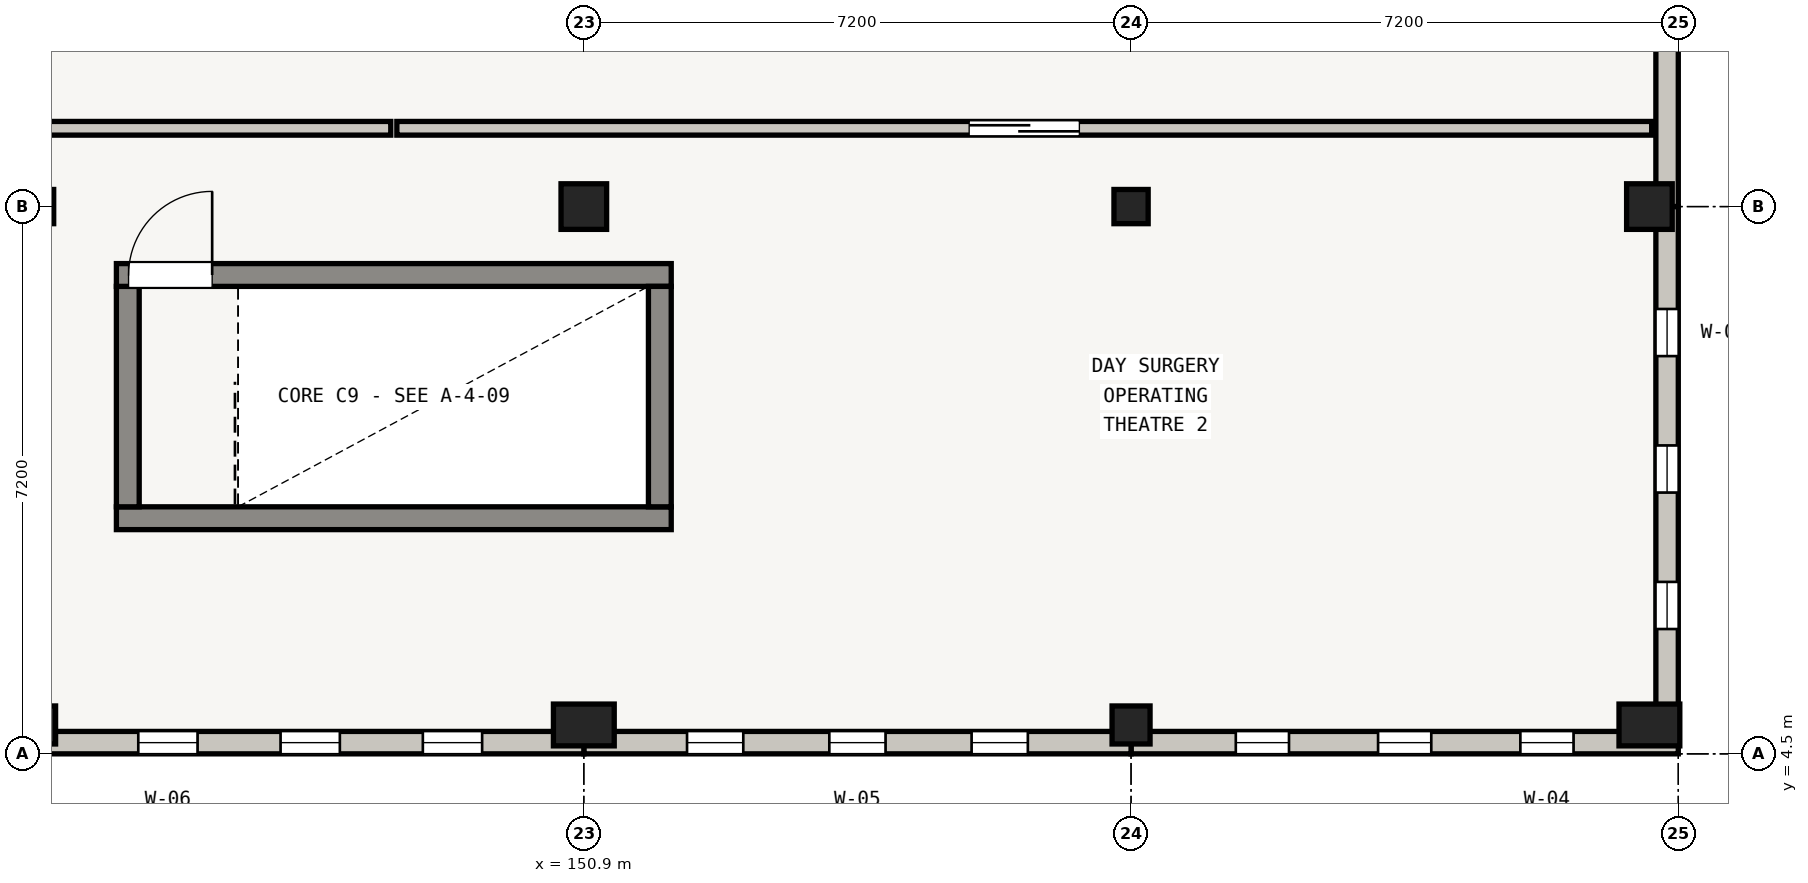
"""IFC4 building model, lengths in metres.
Left out: names, types, materials, properties, quantities, classifications, styles, units other than length and angle.
Written with IfcOpenShell. Run it as: python <this file> out.ifc"""

import sys

from ifc_helpers import new_model, si_unit, direction, frame, frame_2d, origin, origin_2d, place, context, subcontext, project, spatial, rectangle, extrude, element, fill, save


model = new_model("IFC4")
c1 = context("Model", 3, precision=1e-05, world=origin(), true_north=direction((0.0, 1.0)))
c2 = subcontext(c1, "Body", "Model", "MODEL_VIEW")
j1 = project(units=[si_unit("LENGTHUNIT", "METRE"), si_unit("PLANEANGLEUNIT", "RADIAN")], contexts=[c1])
p1 = place(None, origin())
s1 = spatial("IfcSite", under=j1, at=p1, CompositionType="ELEMENT")
p2 = place(p1, origin())
s2 = spatial("IfcBuilding", under=s1, at=p2, CompositionType="ELEMENT")
p3 = place(p2, frame((0.0, 0.0, 8.7)))
s3 = spatial("IfcBuildingStorey", under=s2, at=p3, CompositionType="ELEMENT", Elevation=8.7)
p4 = place(p3, frame((143.7, 4.88, 0.0), z_axis=(0.0, 0.0, 1.0), x_axis=(1.0, 0.0, 0.0)))
e1 = element("IfcColumn", 1, at=p4, inside=s3, PredefinedType="COLUMN", context=c2, shape_type="SweptSolid", body=[
    extrude(rectangle(XDim=0.5, YDim=0.5, at=origin_2d()), origin(), (0.0, 0.0, 1.0), 4.02),
])
p5 = place(p3, frame((143.7, 11.7, 0.0), z_axis=(0.0, 0.0, 1.0), x_axis=(1.0, 0.0, 0.0)))
e2 = element("IfcColumn", 2, at=p5, inside=s3, PredefinedType="COLUMN", context=c2, shape_type="SweptSolid", body=[
    extrude(rectangle(XDim=0.45, YDim=0.45, at=origin_2d()), origin(), (0.0, 0.0, 1.0), 4.02),
])
p6 = place(p3, frame((150.9, 4.88, 0.0), z_axis=(0.0, 0.0, 1.0), x_axis=(1.0, 0.0, 0.0)))
e3 = element("IfcColumn", 3, at=p6, inside=s3, PredefinedType="COLUMN", context=c2, shape_type="SweptSolid", body=[
    extrude(rectangle(XDim=0.8, YDim=0.55, at=origin_2d()), origin(), (0.0, 0.0, 1.0), 4.02),
])
p7 = place(p3, frame((150.9, 11.7, 0.0), z_axis=(0.0, 0.0, 1.0), x_axis=(1.0, 0.0, 0.0)))
e4 = element("IfcColumn", 4, at=p7, inside=s3, PredefinedType="COLUMN", context=c2, shape_type="SweptSolid", body=[
    extrude(rectangle(XDim=0.6, YDim=0.6, at=origin_2d()), origin(), (0.0, 0.0, 1.0), 4.02),
])
p8 = place(p3, frame((158.1, 4.88, 0.0), z_axis=(0.0, 0.0, 1.0), x_axis=(1.0, 0.0, 0.0)))
e5 = element("IfcColumn", 5, at=p8, inside=s3, PredefinedType="COLUMN", context=c2, shape_type="SweptSolid", body=[
    extrude(rectangle(XDim=0.5, YDim=0.5, at=origin_2d()), origin(), (0.0, 0.0, 1.0), 4.02),
])
p9 = place(p3, frame((158.1, 11.7, 0.0), z_axis=(0.0, 0.0, 1.0), x_axis=(1.0, 0.0, 0.0)))
e6 = element("IfcColumn", 6, at=p9, inside=s3, PredefinedType="COLUMN", context=c2, shape_type="SweptSolid", body=[
    extrude(rectangle(XDim=0.45, YDim=0.45, at=origin_2d()), origin(), (0.0, 0.0, 1.0), 4.02),
])
p10 = place(p3, frame((164.92, 4.88, 0.0), z_axis=(0.0, 0.0, 1.0), x_axis=(1.0, 0.0, 0.0)))
e7 = element("IfcColumn", 7, at=p10, inside=s3, PredefinedType="COLUMN", context=c2, shape_type="SweptSolid", body=[
    extrude(rectangle(XDim=0.8, YDim=0.55, at=origin_2d()), origin(), (0.0, 0.0, 1.0), 4.02),
])
p11 = place(p3, frame((164.92, 11.7, 0.0), z_axis=(0.0, 0.0, 1.0), x_axis=(1.0, 0.0, 0.0)))
e8 = element("IfcColumn", 8, at=p11, inside=s3, PredefinedType="COLUMN", context=c2, shape_type="SweptSolid", body=[
    extrude(rectangle(XDim=0.6, YDim=0.6, at=origin_2d()), origin(), (0.0, 0.0, 1.0), 4.02),
])
p12 = place(p3, frame((165.153, 18.605, 0.0), z_axis=(0.0, 0.0, 1.0), x_axis=(0.0, -1.0, 0.0)))
e9 = element("IfcWall", 9, at=p12, inside=s3, PredefinedType="STANDARD", context=c2, shape_type="SweptSolid", body=[
    extrude(rectangle(XDim=6.905, YDim=0.295, at=frame_2d((3.453, 0.0))), origin(), (0.0, 0.0, 1.0), 3.632),
])
p13 = place(p12, frame((1.367, 0.0, 0.55)))
e10 = element("IfcOpeningElement", 10, at=p13, cuts=e9, PredefinedType="OPENING", context=c2, shape_type="SweptSolid", body=[
    extrude(rectangle(XDim=0.58, YDim=2.35, at=frame_2d((0.29, 1.175))), frame((0.0, 0.147, 0.0), z_axis=(0.0, -1.0, 0.0), x_axis=(1.0, 0.0, 0.0)), (0.0, 0.0, 1.0), 0.295),
])
p14 = place(p12, frame((3.913, 0.0, 0.55)))
e11 = element("IfcOpeningElement", 11, at=p14, cuts=e9, PredefinedType="OPENING", context=c2, shape_type="SweptSolid", body=[
    extrude(rectangle(XDim=0.58, YDim=2.35, at=frame_2d((0.29, 1.175))), frame((0.0, 0.147, 0.0), z_axis=(0.0, -1.0, 0.0), x_axis=(1.0, 0.0, 0.0)), (0.0, 0.0, 1.0), 0.295),
])
p15 = place(p3, frame((165.153, 11.7, 0.0), z_axis=(0.0, 0.0, 1.0), x_axis=(0.0, -1.0, 0.0)))
e12 = element("IfcWall", 12, at=p15, inside=s3, PredefinedType="STANDARD", context=c2, shape_type="SweptSolid", body=[
    extrude(rectangle(XDim=6.905, YDim=0.295, at=frame_2d((3.453, 0.0))), origin(), (0.0, 0.0, 1.0), 3.632),
])
p16 = place(p15, frame((1.347, 0.0, 0.55)))
e13 = element("IfcOpeningElement", 13, at=p16, cuts=e12, PredefinedType="OPENING", context=c2, shape_type="SweptSolid", body=[
    extrude(rectangle(XDim=0.62, YDim=2.35, at=frame_2d((0.31, 1.175))), frame((0.0, 0.147, 0.0), z_axis=(0.0, -1.0, 0.0), x_axis=(1.0, 0.0, 0.0)), (0.0, 0.0, 1.0), 0.295),
])
p17 = place(p15, frame((3.143, 0.0, 0.55)))
e14 = element("IfcOpeningElement", 14, at=p17, cuts=e12, PredefinedType="OPENING", context=c2, shape_type="SweptSolid", body=[
    extrude(rectangle(XDim=0.62, YDim=2.35, at=frame_2d((0.31, 1.175))), frame((0.0, 0.147, 0.0), z_axis=(0.0, -1.0, 0.0), x_axis=(1.0, 0.0, 0.0)), (0.0, 0.0, 1.0), 0.295),
])
p18 = place(p15, frame((4.938, 0.0, 0.55)))
e15 = element("IfcOpeningElement", 15, at=p18, cuts=e12, PredefinedType="OPENING", context=c2, shape_type="SweptSolid", body=[
    extrude(rectangle(XDim=0.62, YDim=2.35, at=frame_2d((0.31, 1.175))), frame((0.0, 0.147, 0.0), z_axis=(0.0, -1.0, 0.0), x_axis=(1.0, 0.0, 0.0)), (0.0, 0.0, 1.0), 0.295),
])
p19 = place(p3, frame((165.3, 4.647, 0.0), z_axis=(0.0, 0.0, 1.0), x_axis=(-1.0, 0.0, 0.0)))
e16 = element("IfcWall", 16, at=p19, inside=s3, PredefinedType="STANDARD", context=c2, shape_type="SweptSolid", body=[
    extrude(rectangle(XDim=7.2, YDim=0.295, at=frame_2d((3.6, 0.0))), origin(), (0.0, 0.0, 1.0), 3.632),
])
p20 = place(p19, frame((1.378, 0.0, 0.55)))
e17 = element("IfcOpeningElement", 17, at=p20, cuts=e16, PredefinedType="OPENING", context=c2, shape_type="SweptSolid", body=[
    extrude(rectangle(XDim=0.7, YDim=2.3, at=frame_2d((0.35, 1.15))), frame((0.0, 0.147, 0.0), z_axis=(0.0, -1.0, 0.0), x_axis=(1.0, 0.0, 0.0)), (0.0, 0.0, 1.0), 0.295),
])
p21 = place(p19, frame((3.25, 0.0, 0.55)))
e18 = element("IfcOpeningElement", 18, at=p21, cuts=e16, PredefinedType="OPENING", context=c2, shape_type="SweptSolid", body=[
    extrude(rectangle(XDim=0.7, YDim=2.3, at=frame_2d((0.35, 1.15))), frame((0.0, 0.147, 0.0), z_axis=(0.0, -1.0, 0.0), x_axis=(1.0, 0.0, 0.0)), (0.0, 0.0, 1.0), 0.295),
])
p22 = place(p19, frame((5.122, 0.0, 0.55)))
e19 = element("IfcOpeningElement", 19, at=p22, cuts=e16, PredefinedType="OPENING", context=c2, shape_type="SweptSolid", body=[
    extrude(rectangle(XDim=0.7, YDim=2.3, at=frame_2d((0.35, 1.15))), frame((0.0, 0.147, 0.0), z_axis=(0.0, -1.0, 0.0), x_axis=(1.0, 0.0, 0.0)), (0.0, 0.0, 1.0), 0.295),
])
p23 = place(p3, frame((158.1, 4.647, 0.0), z_axis=(0.0, 0.0, 1.0), x_axis=(-1.0, 0.0, 0.0)))
e20 = element("IfcWall", 20, at=p23, inside=s3, PredefinedType="STANDARD", context=c2, shape_type="SweptSolid", body=[
    extrude(rectangle(XDim=7.2, YDim=0.295, at=frame_2d((3.6, 0.0))), origin(), (0.0, 0.0, 1.0), 3.632),
])
p24 = place(p23, frame((1.358, 0.0, 0.55)))
e21 = element("IfcOpeningElement", 21, at=p24, cuts=e20, PredefinedType="OPENING", context=c2, shape_type="SweptSolid", body=[
    extrude(rectangle(XDim=0.74, YDim=2.25, at=frame_2d((0.37, 1.125))), frame((0.0, 0.147, 0.0), z_axis=(0.0, -1.0, 0.0), x_axis=(1.0, 0.0, 0.0)), (0.0, 0.0, 1.0), 0.295),
])
p25 = place(p23, frame((3.23, 0.0, 0.55)))
e22 = element("IfcOpeningElement", 22, at=p25, cuts=e20, PredefinedType="OPENING", context=c2, shape_type="SweptSolid", body=[
    extrude(rectangle(XDim=0.74, YDim=2.25, at=frame_2d((0.37, 1.125))), frame((0.0, 0.147, 0.0), z_axis=(0.0, -1.0, 0.0), x_axis=(1.0, 0.0, 0.0)), (0.0, 0.0, 1.0), 0.295),
])
p26 = place(p23, frame((5.102, 0.0, 0.55)))
e23 = element("IfcOpeningElement", 23, at=p26, cuts=e20, PredefinedType="OPENING", context=c2, shape_type="SweptSolid", body=[
    extrude(rectangle(XDim=0.74, YDim=2.25, at=frame_2d((0.37, 1.125))), frame((0.0, 0.147, 0.0), z_axis=(0.0, -1.0, 0.0), x_axis=(1.0, 0.0, 0.0)), (0.0, 0.0, 1.0), 0.295),
])
p27 = place(p3, frame((150.9, 4.647, 0.0), z_axis=(0.0, 0.0, 1.0), x_axis=(-1.0, 0.0, 0.0)))
e24 = element("IfcWall", 24, at=p27, inside=s3, PredefinedType="STANDARD", context=c2, shape_type="SweptSolid", body=[
    extrude(rectangle(XDim=7.2, YDim=0.295, at=frame_2d((3.6, 0.0))), origin(), (0.0, 0.0, 1.0), 3.632),
])
p28 = place(p27, frame((1.338, 0.0, 0.55)))
e25 = element("IfcOpeningElement", 25, at=p28, cuts=e24, PredefinedType="OPENING", context=c2, shape_type="SweptSolid", body=[
    extrude(rectangle(XDim=0.78, YDim=2.25, at=frame_2d((0.39, 1.125))), frame((0.0, 0.147, 0.0), z_axis=(0.0, -1.0, 0.0), x_axis=(1.0, 0.0, 0.0)), (0.0, 0.0, 1.0), 0.295),
])
p29 = place(p27, frame((3.21, 0.0, 0.55)))
e26 = element("IfcOpeningElement", 26, at=p29, cuts=e24, PredefinedType="OPENING", context=c2, shape_type="SweptSolid", body=[
    extrude(rectangle(XDim=0.78, YDim=2.25, at=frame_2d((0.39, 1.125))), frame((0.0, 0.147, 0.0), z_axis=(0.0, -1.0, 0.0), x_axis=(1.0, 0.0, 0.0)), (0.0, 0.0, 1.0), 0.295),
])
p30 = place(p27, frame((5.082, 0.0, 0.55)))
e27 = element("IfcOpeningElement", 27, at=p30, cuts=e24, PredefinedType="OPENING", context=c2, shape_type="SweptSolid", body=[
    extrude(rectangle(XDim=0.78, YDim=2.25, at=frame_2d((0.39, 1.125))), frame((0.0, 0.147, 0.0), z_axis=(0.0, -1.0, 0.0), x_axis=(1.0, 0.0, 0.0)), (0.0, 0.0, 1.0), 0.295),
])
p31 = place(p3, frame((152.05, 7.6, 0.0), z_axis=(0.0, 0.0, 1.0), x_axis=(-1.0, 0.0, 0.0)))
e28 = element("IfcWall", 28, at=p31, inside=s3, PredefinedType="SHEAR", context=c2, shape_type="SweptSolid", body=[
    extrude(rectangle(XDim=7.3, YDim=0.3, at=frame_2d((3.65, 0.0))), origin(), (0.0, 0.0, 1.0), 3.905),
])
p32 = place(p3, frame((144.9, 7.75, 0.0), z_axis=(0.0, 0.0, 1.0), x_axis=(0.0, 1.0, 0.0)))
e29 = element("IfcWall", 29, at=p32, inside=s3, PredefinedType="SHEAR", context=c2, shape_type="SweptSolid", body=[
    extrude(rectangle(XDim=2.9, YDim=0.3, at=frame_2d((1.45, 0.0))), origin(), (0.0, 0.0, 1.0), 3.905),
])
p33 = place(p3, frame((144.75, 10.8, 0.0), z_axis=(0.0, 0.0, 1.0), x_axis=(1.0, 0.0, 0.0)))
e30 = element("IfcWall", 30, at=p33, inside=s3, PredefinedType="SHEAR", context=c2, shape_type="SweptSolid", body=[
    extrude(rectangle(XDim=7.3, YDim=0.3, at=frame_2d((3.65, 0.0))), origin(), (0.0, 0.0, 1.0), 3.905),
])
p34 = place(p33, frame((0.16, 0.0, 0.0)))
e31 = element("IfcOpeningElement", 31, at=p34, cuts=e30, PredefinedType="OPENING", context=c2, shape_type="SweptSolid", body=[
    extrude(rectangle(XDim=1.1, YDim=2.05, at=frame_2d((0.55, 1.025))), frame((0.0, 0.15, 0.0), z_axis=(0.0, -1.0, 0.0), x_axis=(1.0, 0.0, 0.0)), (0.0, 0.0, 1.0), 0.3),
])
p35 = place(p3, frame((151.9, 10.65, 0.0), z_axis=(0.0, 0.0, 1.0), x_axis=(0.0, -1.0, 0.0)))
e32 = element("IfcWall", 32, at=p35, inside=s3, PredefinedType="SHEAR", context=c2, shape_type="SweptSolid", body=[
    extrude(rectangle(XDim=2.9, YDim=0.3, at=frame_2d((1.45, 0.0))), origin(), (0.0, 0.0, 1.0), 3.905),
])
p36 = place(p3, frame((124.24, 12.73, 0.0), z_axis=(0.0, 0.0, 1.0), x_axis=(1.0, 0.0, 0.0)))
e33 = element("IfcWall", 33, at=p36, inside=s3, PredefinedType="PARTITIONING", context=c2, shape_type="SweptSolid", body=[
    extrude(rectangle(XDim=24.12, YDim=0.18, at=frame_2d((12.06, 0.0))), origin(), (0.0, 0.0, 1.0), 2.925),
])
p37 = place(p36, frame((7.935, 0.0, 0.0)))
e34 = element("IfcOpeningElement", 34, at=p37, cuts=e33, PredefinedType="OPENING", context=c2, shape_type="SweptSolid", body=[
    extrude(rectangle(XDim=1.45, YDim=2.1, at=frame_2d((0.725, 1.05))), frame((0.0, 0.09, 0.0), z_axis=(0.0, -1.0, 0.0), x_axis=(1.0, 0.0, 0.0)), (0.0, 0.0, 1.0), 0.18),
])
p38 = place(p3, frame((148.44, 12.73, 0.0), z_axis=(0.0, 0.0, 1.0), x_axis=(1.0, 0.0, 0.0)))
e35 = element("IfcWall", 35, at=p38, inside=s3, PredefinedType="PARTITIONING", context=c2, shape_type="SweptSolid", body=[
    extrude(rectangle(XDim=16.51, YDim=0.18, at=frame_2d((8.255, 0.0))), origin(), (0.0, 0.0, 1.0), 2.925),
])
p39 = place(p38, frame((7.53, 0.0, 0.0)))
e36 = element("IfcOpeningElement", 36, at=p39, cuts=e35, PredefinedType="OPENING", context=c2, shape_type="SweptSolid", body=[
    extrude(rectangle(XDim=1.45, YDim=2.1, at=frame_2d((0.725, 1.05))), frame((0.0, 0.09, 0.0), z_axis=(0.0, -1.0, 0.0), x_axis=(1.0, 0.0, 0.0)), (0.0, 0.0, 1.0), 0.18),
])
p40 = place(p16, origin())
e37 = element("IfcWindow", 37, at=p40, inside=s3, PartitioningType="SINGLE_PANEL", PredefinedType="WINDOW", context=c2, shape_type="SweptSolid", body=[
    extrude(rectangle(XDim=0.62, YDim=2.35, at=frame_2d((0.31, 1.175))), frame((0.0, 0.03, 0.0), z_axis=(0.0, -1.0, 0.0), x_axis=(1.0, 0.0, 0.0)), (0.0, 0.0, 1.0), 0.06),
])
fill(e13, e37)
p41 = place(p17, origin())
e38 = element("IfcWindow", 38, at=p41, inside=s3, PartitioningType="SINGLE_PANEL", PredefinedType="WINDOW", context=c2, shape_type="SweptSolid", body=[
    extrude(rectangle(XDim=0.62, YDim=2.35, at=frame_2d((0.31, 1.175))), frame((0.0, 0.03, 0.0), z_axis=(0.0, -1.0, 0.0), x_axis=(1.0, 0.0, 0.0)), (0.0, 0.0, 1.0), 0.06),
])
fill(e14, e38)
p42 = place(p18, origin())
e39 = element("IfcWindow", 39, at=p42, inside=s3, PartitioningType="SINGLE_PANEL", PredefinedType="WINDOW", context=c2, shape_type="SweptSolid", body=[
    extrude(rectangle(XDim=0.62, YDim=2.35, at=frame_2d((0.31, 1.175))), frame((0.0, 0.03, 0.0), z_axis=(0.0, -1.0, 0.0), x_axis=(1.0, 0.0, 0.0)), (0.0, 0.0, 1.0), 0.06),
])
fill(e15, e39)
p43 = place(p20, origin())
e40 = element("IfcWindow", 40, at=p43, inside=s3, PartitioningType="SINGLE_PANEL", PredefinedType="WINDOW", context=c2, shape_type="SweptSolid", body=[
    extrude(rectangle(XDim=0.7, YDim=2.3, at=frame_2d((0.35, 1.15))), frame((0.0, 0.03, 0.0), z_axis=(0.0, -1.0, 0.0), x_axis=(1.0, 0.0, 0.0)), (0.0, 0.0, 1.0), 0.06),
])
fill(e17, e40)
p44 = place(p21, origin())
e41 = element("IfcWindow", 41, at=p44, inside=s3, PartitioningType="SINGLE_PANEL", PredefinedType="WINDOW", context=c2, shape_type="SweptSolid", body=[
    extrude(rectangle(XDim=0.7, YDim=2.3, at=frame_2d((0.35, 1.15))), frame((0.0, 0.03, 0.0), z_axis=(0.0, -1.0, 0.0), x_axis=(1.0, 0.0, 0.0)), (0.0, 0.0, 1.0), 0.06),
])
fill(e18, e41)
p45 = place(p22, origin())
e42 = element("IfcWindow", 42, at=p45, inside=s3, PartitioningType="SINGLE_PANEL", PredefinedType="WINDOW", context=c2, shape_type="SweptSolid", body=[
    extrude(rectangle(XDim=0.7, YDim=2.3, at=frame_2d((0.35, 1.15))), frame((0.0, 0.03, 0.0), z_axis=(0.0, -1.0, 0.0), x_axis=(1.0, 0.0, 0.0)), (0.0, 0.0, 1.0), 0.06),
])
fill(e19, e42)
p46 = place(p24, origin())
e43 = element("IfcWindow", 43, at=p46, inside=s3, PartitioningType="SINGLE_PANEL", PredefinedType="WINDOW", context=c2, shape_type="SweptSolid", body=[
    extrude(rectangle(XDim=0.74, YDim=2.25, at=frame_2d((0.37, 1.125))), frame((0.0, 0.03, 0.0), z_axis=(0.0, -1.0, 0.0), x_axis=(1.0, 0.0, 0.0)), (0.0, 0.0, 1.0), 0.06),
])
fill(e21, e43)
p47 = place(p25, origin())
e44 = element("IfcWindow", 44, at=p47, inside=s3, PartitioningType="SINGLE_PANEL", PredefinedType="WINDOW", context=c2, shape_type="SweptSolid", body=[
    extrude(rectangle(XDim=0.74, YDim=2.25, at=frame_2d((0.37, 1.125))), frame((0.0, 0.03, 0.0), z_axis=(0.0, -1.0, 0.0), x_axis=(1.0, 0.0, 0.0)), (0.0, 0.0, 1.0), 0.06),
])
fill(e22, e44)
p48 = place(p26, origin())
e45 = element("IfcWindow", 45, at=p48, inside=s3, PartitioningType="SINGLE_PANEL", PredefinedType="WINDOW", context=c2, shape_type="SweptSolid", body=[
    extrude(rectangle(XDim=0.74, YDim=2.25, at=frame_2d((0.37, 1.125))), frame((0.0, 0.03, 0.0), z_axis=(0.0, -1.0, 0.0), x_axis=(1.0, 0.0, 0.0)), (0.0, 0.0, 1.0), 0.06),
])
fill(e23, e45)
p49 = place(p28, origin())
e46 = element("IfcWindow", 46, at=p49, inside=s3, PartitioningType="SINGLE_PANEL", PredefinedType="WINDOW", context=c2, shape_type="SweptSolid", body=[
    extrude(rectangle(XDim=0.78, YDim=2.25, at=frame_2d((0.39, 1.125))), frame((0.0, 0.03, 0.0), z_axis=(0.0, -1.0, 0.0), x_axis=(1.0, 0.0, 0.0)), (0.0, 0.0, 1.0), 0.06),
])
fill(e25, e46)
p50 = place(p29, origin())
e47 = element("IfcWindow", 47, at=p50, inside=s3, PartitioningType="SINGLE_PANEL", PredefinedType="WINDOW", context=c2, shape_type="SweptSolid", body=[
    extrude(rectangle(XDim=0.78, YDim=2.25, at=frame_2d((0.39, 1.125))), frame((0.0, 0.03, 0.0), z_axis=(0.0, -1.0, 0.0), x_axis=(1.0, 0.0, 0.0)), (0.0, 0.0, 1.0), 0.06),
])
fill(e26, e47)
p51 = place(p30, origin())
e48 = element("IfcWindow", 48, at=p51, inside=s3, PartitioningType="SINGLE_PANEL", PredefinedType="WINDOW", context=c2, shape_type="SweptSolid", body=[
    extrude(rectangle(XDim=0.78, YDim=2.25, at=frame_2d((0.39, 1.125))), frame((0.0, 0.03, 0.0), z_axis=(0.0, -1.0, 0.0), x_axis=(1.0, 0.0, 0.0)), (0.0, 0.0, 1.0), 0.06),
])
fill(e27, e48)
p52 = place(p34, origin())
e49 = element("IfcDoor", 49, at=p52, inside=s3, OperationType="SINGLE_SWING_RIGHT", PredefinedType="DOOR", context=c2, shape_type="SweptSolid", body=[
    extrude(rectangle(XDim=1.1, YDim=2.05, at=frame_2d((0.55, 1.025))), frame((0.0, 0.025, 0.0), z_axis=(0.0, -1.0, 0.0), x_axis=(1.0, 0.0, 0.0)), (0.0, 0.0, 1.0), 0.05),
])
fill(e31, e49)
p53 = place(p39, origin())
e50 = element("IfcDoor", 50, at=p53, inside=s3, OperationType="SLIDING_TO_LEFT", PredefinedType="DOOR", context=c2, shape_type="SweptSolid", body=[
    extrude(rectangle(XDim=1.45, YDim=2.1, at=frame_2d((0.725, 1.05))), frame((0.0, 0.025, 0.0), z_axis=(0.0, -1.0, 0.0), x_axis=(1.0, 0.0, 0.0)), (0.0, 0.0, 1.0), 0.05),
])
fill(e36, e50)
save(model, sys.argv[1])
